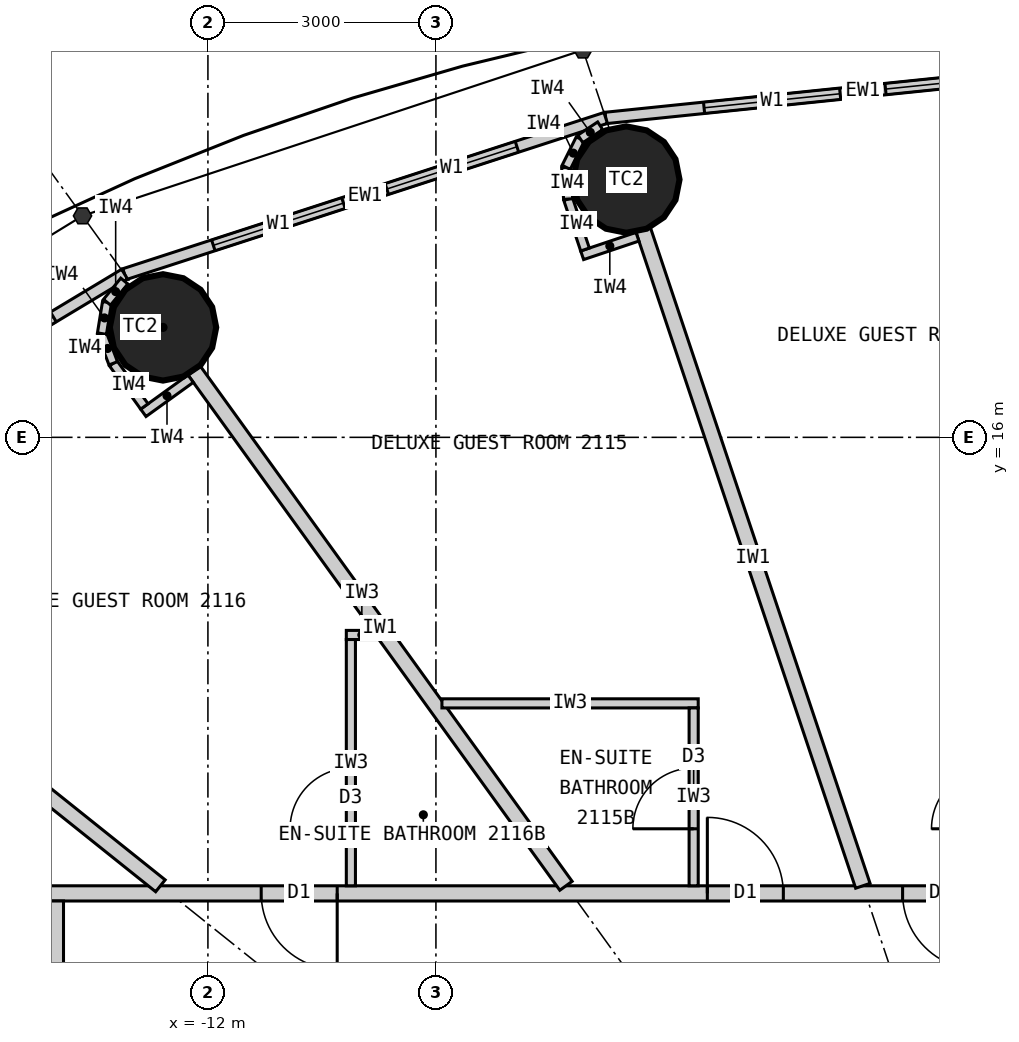
"""IFC4 building model, lengths in metres.
Left out: names, types, materials, properties, quantities, classifications, styles, units other than length and angle.
Written with IfcOpenShell. Run it as: python <this file> out.ifc"""

import sys

from ifc_helpers import new_model, si_unit, direction, frame, frame_2d, origin, origin_2d, place, context, subcontext, project, spatial, rectangle, circle, extrude, element, fill, save


model = new_model("IFC4")
c1 = context("Model", 3, precision=1e-05, world=origin(), true_north=direction((0.0, 1.0)))
c2 = subcontext(c1, "Body", "Model", "MODEL_VIEW")
j1 = project(units=[si_unit("LENGTHUNIT", "METRE"), si_unit("PLANEANGLEUNIT", "RADIAN")], contexts=[c1])
p1 = place(None, origin())
s1 = spatial("IfcSite", under=j1, at=p1, CompositionType="ELEMENT")
p2 = place(p1, origin())
s2 = spatial("IfcBuilding", under=s1, at=p2, CompositionType="ELEMENT")
p3 = place(p2, frame((0.0, 0.0, 83.7)))
s3 = spatial("IfcBuildingStorey", under=s2, at=p3, CompositionType="ELEMENT", Elevation=83.7)
for number, where, z_axis, x_axis in (
    (1, (-6.495, 19.391, 0.0), (0.0, 0.0, 1.0), (1.0, 0.0, 0.0)),
    (2, (-12.591, 17.447, 0.0), (0.0, 0.0, 1.0), (1.0, 0.0, 0.0)),
):
    element("IfcColumn", number, at=place(p3, frame(where, z_axis=z_axis, x_axis=x_axis)), inside=s3, PredefinedType="COLUMN", context=c2, shape_type="SweptSolid", body=[
        extrude(circle(Radius=0.7, at=origin_2d()), origin(), (0.0, 0.0, 1.0), 3.3),
    ])
p4 = place(p3, frame((0.0, 20.9, 0.0), z_axis=(0.0, 0.0, 1.0), x_axis=(-0.994721394369, -0.102612609291, 0.0)))
e3 = element("IfcWall", 3, at=p4, inside=s3, PredefinedType="ELEMENTEDWALL", context=c2, shape_type="SweptSolid", body=[
    extrude(rectangle(XDim=6.802, YDim=0.15, at=frame_2d((3.401, 0.0))), origin(), (0.0, 0.0, 1.0), 3.12),
])
p5 = place(p4, frame((1.301, 0.0, 0.9)))
e4 = element("IfcOpeningElement", 4, at=p5, cuts=e3, PredefinedType="OPENING", context=c2, shape_type="SweptSolid", body=[
    extrude(rectangle(XDim=1.8, YDim=1.9, at=frame_2d((0.9, 0.95))), frame((0.0, 0.085, 0.0), z_axis=(0.0, -1.0, 0.0), x_axis=(1.0, 0.0, 0.0)), (0.0, 0.0, 1.0), 0.17),
])
p6 = place(p4, frame((3.701, 0.0, 0.9)))
e5 = element("IfcOpeningElement", 5, at=p6, cuts=e3, PredefinedType="OPENING", context=c2, shape_type="SweptSolid", body=[
    extrude(rectangle(XDim=1.8, YDim=1.9, at=frame_2d((0.9, 0.95))), frame((0.0, 0.085, 0.0), z_axis=(0.0, -1.0, 0.0), x_axis=(1.0, 0.0, 0.0)), (0.0, 0.0, 1.0), 0.17),
])
p7 = place(p3, frame((-6.766, 20.202, 0.0), z_axis=(0.0, 0.0, 1.0), x_axis=(-0.951137534625, -0.308767534285, 0.0)))
e6 = element("IfcWall", 6, at=p7, inside=s3, PredefinedType="ELEMENTEDWALL", context=c2, shape_type="SweptSolid", body=[
    extrude(rectangle(XDim=6.655, YDim=0.15, at=frame_2d((3.328, 0.0))), origin(), (0.0, 0.0, 1.0), 3.12),
])
p8 = place(p7, frame((1.228, 0.0, 0.9)))
e7 = element("IfcOpeningElement", 7, at=p8, cuts=e6, PredefinedType="OPENING", context=c2, shape_type="SweptSolid", body=[
    extrude(rectangle(XDim=1.8, YDim=1.9, at=frame_2d((0.9, 0.95))), frame((0.0, 0.085, 0.0), z_axis=(0.0, -1.0, 0.0), x_axis=(1.0, 0.0, 0.0)), (0.0, 0.0, 1.0), 0.17),
])
p9 = place(p7, frame((3.628, 0.0, 0.9)))
e8 = element("IfcOpeningElement", 8, at=p9, cuts=e6, PredefinedType="OPENING", context=c2, shape_type="SweptSolid", body=[
    extrude(rectangle(XDim=1.8, YDim=1.9, at=frame_2d((0.9, 0.95))), frame((0.0, 0.085, 0.0), z_axis=(0.0, -1.0, 0.0), x_axis=(1.0, 0.0, 0.0)), (0.0, 0.0, 1.0), 0.17),
])
p10 = place(p3, frame((-13.096, 18.147, 0.0), z_axis=(0.0, 0.0, 1.0), x_axis=(-0.856983180864, -0.515344377787, 0.0)))
e9 = element("IfcWall", 9, at=p10, inside=s3, PredefinedType="ELEMENTEDWALL", context=c2, shape_type="SweptSolid", body=[
    extrude(rectangle(XDim=6.386, YDim=0.15, at=frame_2d((3.193, 0.0))), origin(), (0.0, 0.0, 1.0), 3.12),
])
p11 = place(p10, frame((1.093, 0.0, 0.9)))
e10 = element("IfcOpeningElement", 10, at=p11, cuts=e9, PredefinedType="OPENING", context=c2, shape_type="SweptSolid", body=[
    extrude(rectangle(XDim=1.8, YDim=1.9, at=frame_2d((0.9, 0.95))), frame((0.0, 0.085, 0.0), z_axis=(0.0, -1.0, 0.0), x_axis=(1.0, 0.0, 0.0)), (0.0, 0.0, 1.0), 0.17),
])
p12 = place(p10, frame((3.493, 0.0, 0.9)))
e11 = element("IfcOpeningElement", 11, at=p12, cuts=e9, PredefinedType="OPENING", context=c2, shape_type="SweptSolid", body=[
    extrude(rectangle(XDim=1.8, YDim=1.9, at=frame_2d((0.9, 0.95))), frame((0.0, 0.085, 0.0), z_axis=(0.0, -1.0, 0.0), x_axis=(1.0, 0.0, 0.0)), (0.0, 0.0, 1.0), 0.17),
])
p13 = place(p3, frame((-14.1, 10.0, 0.0), z_axis=(0.0, 0.0, 1.0), x_axis=(1.0, 0.0, 0.0)))
e12 = element("IfcWall", 12, at=p13, inside=s3, PredefinedType="PARTITIONING", context=c2, shape_type="SweptSolid", body=[
    extrude(rectangle(XDim=28.2, YDim=0.2, at=frame_2d((14.1, 0.0))), origin(), (0.0, 0.0, 1.0), 3.12),
])
p14 = place(p13, frame((23.865, 0.0, 0.0)))
e13 = element("IfcOpeningElement", 13, at=p14, cuts=e12, PredefinedType="OPENING", context=c2, shape_type="SweptSolid", body=[
    extrude(rectangle(XDim=1.0, YDim=2.2, at=frame_2d((0.5, 1.1))), frame((0.0, 0.11, 0.0), z_axis=(0.0, -1.0, 0.0), x_axis=(1.0, 0.0, 0.0)), (0.0, 0.0, 1.0), 0.22),
])
p15 = place(p13, frame((18.529, 0.0, 0.0)))
e14 = element("IfcOpeningElement", 14, at=p15, cuts=e12, PredefinedType="OPENING", context=c2, shape_type="SweptSolid", body=[
    extrude(rectangle(XDim=1.0, YDim=2.2, at=frame_2d((0.5, 1.1))), frame((0.0, 0.11, 0.0), z_axis=(0.0, -1.0, 0.0), x_axis=(1.0, 0.0, 0.0)), (0.0, 0.0, 1.0), 0.22),
])
p16 = place(p13, frame((14.623, 0.0, 0.0)))
e15 = element("IfcOpeningElement", 15, at=p16, cuts=e12, PredefinedType="OPENING", context=c2, shape_type="SweptSolid", body=[
    extrude(rectangle(XDim=1.0, YDim=2.2, at=frame_2d((0.5, 1.1))), frame((0.0, 0.11, 0.0), z_axis=(0.0, -1.0, 0.0), x_axis=(1.0, 0.0, 0.0)), (0.0, 0.0, 1.0), 0.22),
])
p17 = place(p13, frame((11.24, 0.0, 0.0)))
e16 = element("IfcOpeningElement", 16, at=p17, cuts=e12, PredefinedType="OPENING", context=c2, shape_type="SweptSolid", body=[
    extrude(rectangle(XDim=1.0, YDim=2.2, at=frame_2d((0.5, 1.1))), frame((0.0, 0.11, 0.0), z_axis=(0.0, -1.0, 0.0), x_axis=(1.0, 0.0, 0.0)), (0.0, 0.0, 1.0), 0.22),
])
p18 = place(p13, frame((8.671, 0.0, 0.0)))
e17 = element("IfcOpeningElement", 17, at=p18, cuts=e12, PredefinedType="OPENING", context=c2, shape_type="SweptSolid", body=[
    extrude(rectangle(XDim=1.0, YDim=2.2, at=frame_2d((0.5, 1.1))), frame((0.0, 0.11, 0.0), z_axis=(0.0, -1.0, 0.0), x_axis=(1.0, 0.0, 0.0)), (0.0, 0.0, 1.0), 0.22),
])
p19 = place(p13, frame((2.801, 0.0, 0.0)))
e18 = element("IfcOpeningElement", 18, at=p19, cuts=e12, PredefinedType="OPENING", context=c2, shape_type="SweptSolid", body=[
    extrude(rectangle(XDim=1.0, YDim=2.2, at=frame_2d((0.5, 1.1))), frame((0.0, 0.11, 0.0), z_axis=(0.0, -1.0, 0.0), x_axis=(1.0, 0.0, 0.0)), (0.0, 0.0, 1.0), 0.22),
])
p20 = place(p3, frame((-14.0, 9.9, 0.0), z_axis=(0.0, 0.0, 1.0), x_axis=(0.0, -1.0, 0.0)))
e19 = element("IfcWall", 19, at=p20, inside=s3, PredefinedType="PARTITIONING", context=c2, shape_type="SweptSolid", body=[
    extrude(rectangle(XDim=19.8, YDim=0.2, at=frame_2d((9.9, 0.0))), origin(), (0.0, 0.0, 1.0), 3.12),
])
p21 = place(p20, frame((7.097, 0.0, 0.0)))
e20 = element("IfcOpeningElement", 20, at=p21, cuts=e19, PredefinedType="OPENING", context=c2, shape_type="SweptSolid", body=[
    extrude(rectangle(XDim=1.0, YDim=2.2, at=frame_2d((0.5, 1.1))), frame((0.0, 0.11, 0.0), z_axis=(0.0, -1.0, 0.0), x_axis=(1.0, 0.0, 0.0)), (0.0, 0.0, 1.0), 0.22),
])
p22 = place(p20, frame((10.778, 0.0, 0.0)))
e21 = element("IfcOpeningElement", 21, at=p22, cuts=e19, PredefinedType="OPENING", context=c2, shape_type="SweptSolid", body=[
    extrude(rectangle(XDim=1.0, YDim=2.2, at=frame_2d((0.5, 1.1))), frame((0.0, 0.11, 0.0), z_axis=(0.0, -1.0, 0.0), x_axis=(1.0, 0.0, 0.0)), (0.0, 0.0, 1.0), 0.22),
])
p23 = place(p20, frame((13.552, 0.0, 0.0)))
e22 = element("IfcOpeningElement", 22, at=p23, cuts=e19, PredefinedType="OPENING", context=c2, shape_type="SweptSolid", body=[
    extrude(rectangle(XDim=1.0, YDim=2.2, at=frame_2d((0.5, 1.1))), frame((0.0, 0.11, 0.0), z_axis=(0.0, -1.0, 0.0), x_axis=(1.0, 0.0, 0.0)), (0.0, 0.0, 1.0), 0.22),
])
p24 = place(p20, frame((18.698, 0.0, 0.0)))
e23 = element("IfcOpeningElement", 23, at=p24, cuts=e19, PredefinedType="OPENING", context=c2, shape_type="SweptSolid", body=[
    extrude(rectangle(XDim=1.0, YDim=2.2, at=frame_2d((0.5, 1.1))), frame((0.0, 0.11, 0.0), z_axis=(0.0, -1.0, 0.0), x_axis=(1.0, 0.0, 0.0)), (0.0, 0.0, 1.0), 0.22),
])
p25 = place(p20, frame((1.877, 0.0, 0.0)))
e24 = element("IfcOpeningElement", 24, at=p25, cuts=e19, PredefinedType="OPENING", context=c2, shape_type="SweptSolid", body=[
    extrude(rectangle(XDim=1.0, YDim=2.2, at=frame_2d((0.5, 1.1))), frame((0.0, 0.11, 0.0), z_axis=(0.0, -1.0, 0.0), x_axis=(1.0, 0.0, 0.0)), (0.0, 0.0, 1.0), 0.22),
])
p26 = place(p3, frame((-3.383, 10.1, 0.0), z_axis=(0.0, 0.0, 1.0), x_axis=(-0.31759592231, 0.948226149256, 0.0)))
e25 = element("IfcWall", 25, at=p26, inside=s3, PredefinedType="PARTITIONING", context=c2, shape_type="SweptSolid", body=[
    extrude(rectangle(XDim=9.098, YDim=0.2, at=frame_2d((4.549, 0.0))), origin(), (0.0, 0.0, 1.0), 2.32),
])
p27 = place(p3, frame((-7.289, 10.1, 0.0), z_axis=(0.0, 0.0, 1.0), x_axis=(-0.585198353053, 0.810890182197, 0.0)))
e26 = element("IfcWall", 26, at=p27, inside=s3, PredefinedType="PARTITIONING", context=c2, shape_type="SweptSolid", body=[
    extrude(rectangle(XDim=8.36, YDim=0.2, at=frame_2d((4.18, 0.0))), origin(), (0.0, 0.0, 1.0), 2.32),
])
p28 = place(p3, frame((-12.625, 10.1, 0.0), z_axis=(0.0, 0.0, 1.0), x_axis=(-0.780892451574, 0.624665493744, 0.0)))
e27 = element("IfcWall", 27, at=p28, inside=s3, PredefinedType="PARTITIONING", context=c2, shape_type="SweptSolid", body=[
    extrude(rectangle(XDim=6.045, YDim=0.2, at=frame_2d((3.022, 0.0))), origin(), (0.0, 0.0, 1.0), 2.32),
])
p29 = place(p3, frame((-8.921, 12.5, 0.0), z_axis=(0.0, 0.0, 1.0), x_axis=(1.0, 0.0, 0.0)))
e28 = element("IfcWall", 28, at=p29, inside=s3, PredefinedType="PARTITIONING", context=c2, shape_type="SweptSolid", body=[
    extrude(rectangle(XDim=3.372, YDim=0.12, at=frame_2d((1.686, 0.0))), origin(), (0.0, 0.0, 1.0), 3.12),
])
p30 = place(p3, frame((-5.609, 10.1, 0.0), z_axis=(0.0, 0.0, 1.0), x_axis=(0.0, 1.0, 0.0)))
e29 = element("IfcWall", 29, at=p30, inside=s3, PredefinedType="PARTITIONING", context=c2, shape_type="SweptSolid", body=[
    extrude(rectangle(XDim=2.34, YDim=0.12, at=frame_2d((1.17, 0.0))), origin(), (0.0, 0.0, 1.0), 3.12),
])
p31 = place(p30, frame((0.75, 0.0, 0.0)))
e30 = element("IfcOpeningElement", 30, at=p31, cuts=e29, PredefinedType="OPENING", context=c2, shape_type="SweptSolid", body=[
    extrude(rectangle(XDim=0.8, YDim=2.1, at=frame_2d((0.4, 1.05))), frame((0.0, 0.07, 0.0), z_axis=(0.0, -1.0, 0.0), x_axis=(1.0, 0.0, 0.0)), (0.0, 0.0, 1.0), 0.14),
])
p32 = place(p3, frame((-9.771, 13.4, 0.0), z_axis=(0.0, 0.0, 1.0), x_axis=(-1.0, 0.0, 0.0)))
e31 = element("IfcWall", 31, at=p32, inside=s3, PredefinedType="PARTITIONING", context=c2, shape_type="SweptSolid", body=[
    extrude(rectangle(XDim=0.408, YDim=0.12, at=frame_2d((0.204, 0.0))), origin(), (0.0, 0.0, 1.0), 3.12),
])
p33 = place(p3, frame((-10.119, 10.1, 0.0), z_axis=(0.0, 0.0, 1.0), x_axis=(0.0, 1.0, 0.0)))
e32 = element("IfcWall", 32, at=p33, inside=s3, PredefinedType="PARTITIONING", context=c2, shape_type="SweptSolid", body=[
    extrude(rectangle(XDim=3.24, YDim=0.12, at=frame_2d((1.62, 0.0))), origin(), (0.0, 0.0, 1.0), 3.12),
])
p34 = place(p33, frame((0.75, 0.0, 0.0)))
e33 = element("IfcOpeningElement", 33, at=p34, cuts=e32, PredefinedType="OPENING", context=c2, shape_type="SweptSolid", body=[
    extrude(rectangle(XDim=0.8, YDim=2.1, at=frame_2d((0.4, 1.05))), frame((0.0, 0.07, 0.0), z_axis=(0.0, -1.0, 0.0), x_axis=(1.0, 0.0, 0.0)), (0.0, 0.0, 1.0), 0.14),
])
p35 = place(p3, frame((-6.348, 18.639, 0.0), z_axis=(0.0, 0.0, 1.0), x_axis=(-0.948268951266, -0.317468102437, 0.0)))
e34 = element("IfcWall", 34, at=p35, inside=s3, PredefinedType="PARTITIONING", context=c2, shape_type="SweptSolid", body=[
    extrude(rectangle(XDim=0.768, YDim=0.12, at=frame_2d((0.384, 0.0))), origin(), (0.0, 0.0, 1.0), 3.12),
])
p36 = place(p3, frame((-7.038, 18.471, 0.0), z_axis=(0.0, 0.0, 1.0), x_axis=(-0.317378466199, 0.9482989556, 0.0)))
e35 = element("IfcWall", 35, at=p36, inside=s3, PredefinedType="PARTITIONING", context=c2, shape_type="SweptSolid", body=[
    extrude(rectangle(XDim=0.7, YDim=0.12, at=frame_2d((0.35, 0.0))), origin(), (0.0, 0.0, 1.0), 3.12),
])
p37 = place(p3, frame((-7.26, 19.135, 0.0), z_axis=(0.0, 0.0, 1.0), x_axis=(-0.0613238046, 0.99811792439, 0.0)))
e36 = element("IfcWall", 36, at=p37, inside=s3, PredefinedType="PARTITIONING", context=c2, shape_type="SweptSolid", body=[
    extrude(rectangle(XDim=0.418, YDim=0.12, at=frame_2d((0.209, 0.0))), origin(), (0.0, 0.0, 1.0), 3.12),
])
p38 = place(p3, frame((-7.286, 19.552, 0.0), z_axis=(0.0, 0.0, 1.0), x_axis=(0.445810757773, 0.89512723579, 0.0)))
e37 = element("IfcWall", 37, at=p38, inside=s3, PredefinedType="PARTITIONING", context=c2, shape_type="SweptSolid", body=[
    extrude(rectangle(XDim=0.418, YDim=0.12, at=frame_2d((0.209, 0.0))), origin(), (0.0, 0.0, 1.0), 3.12),
])
p39 = place(p3, frame((-7.1, 19.926, 0.0), z_axis=(0.0, 0.0, 1.0), x_axis=(0.833488262509, 0.552537162787, 0.0)))
e38 = element("IfcWall", 38, at=p39, inside=s3, PredefinedType="PARTITIONING", context=c2, shape_type="SweptSolid", body=[
    extrude(rectangle(XDim=0.313, YDim=0.12, at=frame_2d((0.156, 0.0))), origin(), (0.0, 0.0, 1.0), 3.12),
])
p40 = place(p3, frame((-12.227, 16.772, 0.0), z_axis=(0.0, 0.0, 1.0), x_axis=(-0.810821798253, -0.585293098778, 0.0)))
e39 = element("IfcWall", 39, at=p40, inside=s3, PredefinedType="PARTITIONING", context=c2, shape_type="SweptSolid", body=[
    extrude(rectangle(XDim=0.768, YDim=0.12, at=frame_2d((0.384, 0.0))), origin(), (0.0, 0.0, 1.0), 3.12),
])
p41 = place(p3, frame((-12.836, 16.406, 0.0), z_axis=(0.0, 0.0, 1.0), x_axis=(-0.585223113993, 0.810872312296, 0.0)))
e40 = element("IfcWall", 40, at=p41, inside=s3, PredefinedType="PARTITIONING", context=c2, shape_type="SweptSolid", body=[
    extrude(rectangle(XDim=0.7, YDim=0.12, at=frame_2d((0.35, 0.0))), origin(), (0.0, 0.0, 1.0), 3.12),
])
p42 = place(p3, frame((-13.246, 16.974, 0.0), z_axis=(0.0, 0.0, 1.0), x_axis=(-0.355728122235, 0.934589483705, 0.0)))
e41 = element("IfcWall", 41, at=p42, inside=s3, PredefinedType="PARTITIONING", context=c2, shape_type="SweptSolid", body=[
    extrude(rectangle(XDim=0.418, YDim=0.12, at=frame_2d((0.209, 0.0))), origin(), (0.0, 0.0, 1.0), 3.12),
])
p43 = place(p3, frame((-13.394, 17.365, 0.0), z_axis=(0.0, 0.0, 1.0), x_axis=(0.159379276926, 0.987217425943, 0.0)))
e42 = element("IfcWall", 42, at=p43, inside=s3, PredefinedType="PARTITIONING", context=c2, shape_type="SweptSolid", body=[
    extrude(rectangle(XDim=0.418, YDim=0.12, at=frame_2d((0.209, 0.0))), origin(), (0.0, 0.0, 1.0), 3.12),
])
p44 = place(p3, frame((-13.328, 17.777, 0.0), z_axis=(0.0, 0.0, 1.0), x_axis=(0.632276783541, 0.774742582407, 0.0)))
e43 = element("IfcWall", 43, at=p44, inside=s3, PredefinedType="PARTITIONING", context=c2, shape_type="SweptSolid", body=[
    extrude(rectangle(XDim=0.36, YDim=0.12, at=frame_2d((0.18, 0.0))), origin(), (0.0, 0.0, 1.0), 3.12),
])
p45 = place(p5, origin())
e44 = element("IfcWindow", 44, at=p45, inside=s3, PartitioningType="SINGLE_PANEL", PredefinedType="WINDOW", context=c2, shape_type="SweptSolid", body=[
    extrude(rectangle(XDim=1.8, YDim=1.9, at=frame_2d((0.9, 0.95))), frame((0.0, 0.03, 0.0), z_axis=(0.0, -1.0, 0.0), x_axis=(1.0, 0.0, 0.0)), (0.0, 0.0, 1.0), 0.06),
])
fill(e4, e44)
p46 = place(p6, origin())
e45 = element("IfcWindow", 45, at=p46, inside=s3, PartitioningType="SINGLE_PANEL", PredefinedType="WINDOW", context=c2, shape_type="SweptSolid", body=[
    extrude(rectangle(XDim=1.8, YDim=1.9, at=frame_2d((0.9, 0.95))), frame((0.0, 0.03, 0.0), z_axis=(0.0, -1.0, 0.0), x_axis=(1.0, 0.0, 0.0)), (0.0, 0.0, 1.0), 0.06),
])
fill(e5, e45)
p47 = place(p8, origin())
e46 = element("IfcWindow", 46, at=p47, inside=s3, PartitioningType="SINGLE_PANEL", PredefinedType="WINDOW", context=c2, shape_type="SweptSolid", body=[
    extrude(rectangle(XDim=1.8, YDim=1.9, at=frame_2d((0.9, 0.95))), frame((0.0, 0.03, 0.0), z_axis=(0.0, -1.0, 0.0), x_axis=(1.0, 0.0, 0.0)), (0.0, 0.0, 1.0), 0.06),
])
fill(e7, e46)
p48 = place(p9, origin())
e47 = element("IfcWindow", 47, at=p48, inside=s3, PartitioningType="SINGLE_PANEL", PredefinedType="WINDOW", context=c2, shape_type="SweptSolid", body=[
    extrude(rectangle(XDim=1.8, YDim=1.9, at=frame_2d((0.9, 0.95))), frame((0.0, 0.03, 0.0), z_axis=(0.0, -1.0, 0.0), x_axis=(1.0, 0.0, 0.0)), (0.0, 0.0, 1.0), 0.06),
])
fill(e8, e47)
p49 = place(p11, origin())
e48 = element("IfcWindow", 48, at=p49, inside=s3, PartitioningType="SINGLE_PANEL", PredefinedType="WINDOW", context=c2, shape_type="SweptSolid", body=[
    extrude(rectangle(XDim=1.8, YDim=1.9, at=frame_2d((0.9, 0.95))), frame((0.0, 0.03, 0.0), z_axis=(0.0, -1.0, 0.0), x_axis=(1.0, 0.0, 0.0)), (0.0, 0.0, 1.0), 0.06),
])
fill(e10, e48)
p50 = place(p17, origin())
e49 = element("IfcDoor", 49, at=p50, inside=s3, OperationType="SINGLE_SWING_RIGHT", PredefinedType="DOOR", context=c2, shape_type="SweptSolid", body=[
    extrude(rectangle(XDim=1.0, YDim=2.2, at=frame_2d((0.5, 1.1))), frame((0.0, 0.025, 0.0), z_axis=(0.0, -1.0, 0.0), x_axis=(1.0, 0.0, 0.0)), (0.0, 0.0, 1.0), 0.05),
])
fill(e16, e49)
p51 = place(p31, origin())
e50 = element("IfcDoor", 50, at=p51, inside=s3, OperationType="SINGLE_SWING_LEFT", PredefinedType="DOOR", context=c2, shape_type="SweptSolid", body=[
    extrude(rectangle(XDim=0.8, YDim=2.1, at=frame_2d((0.4, 1.05))), frame((0.0, 0.025, 0.0), z_axis=(0.0, -1.0, 0.0), x_axis=(1.0, 0.0, 0.0)), (0.0, 0.0, 1.0), 0.05),
])
fill(e30, e50)
p52 = place(p18, origin())
e51 = element("IfcDoor", 51, at=p52, inside=s3, OperationType="SINGLE_SWING_LEFT", PredefinedType="DOOR", context=c2, shape_type="SweptSolid", body=[
    extrude(rectangle(XDim=1.0, YDim=2.2, at=frame_2d((0.5, 1.1))), frame((0.0, 0.025, 0.0), z_axis=(0.0, -1.0, 0.0), x_axis=(1.0, 0.0, 0.0)), (0.0, 0.0, 1.0), 0.05),
])
fill(e17, e51)
p53 = place(p34, origin())
e52 = element("IfcDoor", 52, at=p53, inside=s3, OperationType="SINGLE_SWING_LEFT", PredefinedType="DOOR", context=c2, shape_type="SweptSolid", body=[
    extrude(rectangle(XDim=0.8, YDim=2.1, at=frame_2d((0.4, 1.05))), frame((0.0, 0.025, 0.0), z_axis=(0.0, -1.0, 0.0), x_axis=(1.0, 0.0, 0.0)), (0.0, 0.0, 1.0), 0.05),
])
fill(e33, e52)
p54 = place(p19, origin())
e53 = element("IfcDoor", 53, at=p54, inside=s3, OperationType="SINGLE_SWING_RIGHT", PredefinedType="DOOR", context=c2, shape_type="SweptSolid", body=[
    extrude(rectangle(XDim=1.0, YDim=2.2, at=frame_2d((0.5, 1.1))), frame((0.0, 0.025, 0.0), z_axis=(0.0, -1.0, 0.0), x_axis=(1.0, 0.0, 0.0)), (0.0, 0.0, 1.0), 0.05),
])
fill(e18, e53)
save(model, sys.argv[1])
